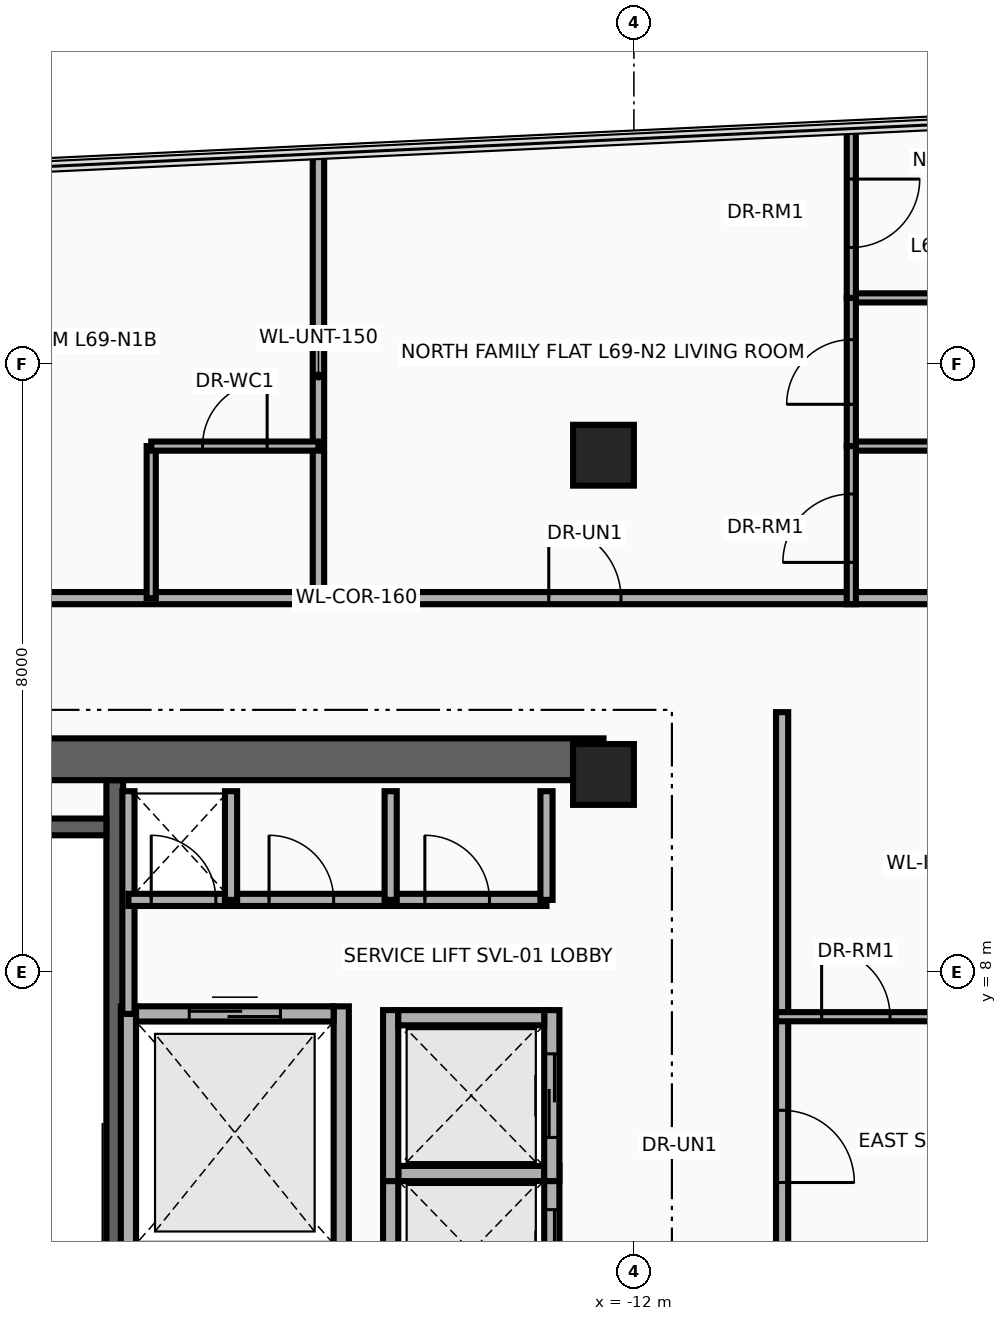
"""IFC4 building model, lengths in metres.
Left out: names, types, materials, properties, quantities, classifications, styles, units other than length and angle.
Written with IfcOpenShell. Run it as: python <this file> out.ifc"""

import sys

from ifc_helpers import new_model, si_unit, direction, frame, frame_2d, origin, origin_2d, place, context, subcontext, project, spatial, rectangle, extrude, source, transform, mapped, element, fill, save


model = new_model("IFC4")
c1 = context("Model", 3, precision=1e-05, world=origin(), true_north=direction((0.0, 1.0)))
c2 = subcontext(c1, "Body", "Model", "MODEL_VIEW")
j1 = project(units=[si_unit("LENGTHUNIT", "METRE"), si_unit("PLANEANGLEUNIT", "RADIAN")], contexts=[c1])
p1 = place(None, origin())
s1 = spatial("IfcSite", under=j1, at=p1, CompositionType="ELEMENT")
p2 = place(p1, origin())
s2 = spatial("IfcBuilding", under=s1, at=p2, CompositionType="ELEMENT")
p3 = place(p2, frame((0.0, 0.0, 266.0)))
s3 = spatial("IfcBuildingStorey", under=s2, at=p3, CompositionType="ELEMENT", Elevation=266.0)
p4 = place(p3, frame((-18.83, 1.78, 0.0), z_axis=(0.0, 0.0, 1.0), x_axis=(0.0, 1.0, 0.0)))
e1 = element("IfcWall", 1, at=p4, inside=s3, PredefinedType="SHEAR", context=c2, shape_type="SweptSolid", body=[
    extrude(rectangle(XDim=8.745, YDim=0.22, at=frame_2d((4.373, 0.0))), origin(), (0.0, 0.0, 1.0), 3.26),
])
p5 = place(p3, frame((-22.05, 9.91, 0.0), z_axis=(0.0, 0.0, 1.0), x_axis=(1.0, 0.0, 0.0)))
e2 = element("IfcWall", 2, at=p5, inside=s3, PredefinedType="SHEAR", context=c2, shape_type="SweptSolid", body=[
    extrude(rectangle(XDim=3.11, YDim=0.22, at=frame_2d((1.555, 0.0))), origin(), (0.0, 0.0, 1.0), 3.26),
])
p6 = place(p3, frame((-22.65, 10.8, 0.0), z_axis=(0.0, 0.0, 1.0), x_axis=(1.0, 0.0, 0.0)))
e3 = element("IfcWall", 3, at=p6, inside=s3, PredefinedType="SHEAR", context=c2, shape_type="SweptSolid", body=[
    extrude(rectangle(XDim=10.25, YDim=0.55, at=frame_2d((5.125, 0.0))), origin(), (0.0, 0.0, 1.0), 3.26),
])
m1 = source(origin(), c2, "Body", "SweptSolid", [
    extrude(rectangle(XDim=0.8, YDim=0.8, at=origin_2d()), origin(), (0.0, 0.0, 1.0), 3.5),
])
for number, where, z_axis, x_axis in (
    (4, (-12.4, 10.6, 0.0), (0.0, 0.0, 1.0), (1.0, 0.0, 0.0)),
    (5, (-12.4, 14.8, 0.0), (0.0, 0.0, 1.0), (1.0, 0.0, 0.0)),
):
    element("IfcColumn", number, at=place(p3, frame(where, z_axis=z_axis, x_axis=x_axis)), inside=s3, PredefinedType="COLUMN", context=c2, shape_type="MappedRepresentation", body=[
        mapped(m1, transform((0.0, 0.0, 0.0), x_axis=(1.0, 0.0, 0.0), y_axis=(0.0, 1.0, 0.0), z_axis=(0.0, 0.0, 1.0), scale=1.0)),
    ])
for number, where, z_axis, x_axis in (
    (6, (-18.65, 4.225, 0.0), (0.0, 0.0, 1.0), (0.0, 1.0, 0.0)),
    (7, (-15.85, 4.225, 0.0), (0.0, 0.0, 1.0), (0.0, 1.0, 0.0)),
):
    element("IfcWall", number, at=place(p3, frame(where, z_axis=z_axis, x_axis=x_axis)), inside=s3, PredefinedType="MOVABLE", context=c2, shape_type="SweptSolid", body=[
        extrude(rectangle(XDim=3.325, YDim=0.2, at=frame_2d((1.663, 0.0))), origin(), (0.0, 0.0, 1.0), 3.26),
    ])
p7 = place(p3, frame((-18.55, 7.45, 0.0), z_axis=(0.0, 0.0, 1.0), x_axis=(1.0, 0.0, 0.0)))
e8 = element("IfcWall", 8, at=p7, inside=s3, PredefinedType="MOVABLE", context=c2, shape_type="SweptSolid", body=[
    extrude(rectangle(XDim=2.6, YDim=0.2, at=frame_2d((1.3, 0.0))), origin(), (0.0, 0.0, 1.0), 3.26),
])
p8 = place(p7, frame((0.7, 0.0, 0.0)))
e9 = element("IfcOpeningElement", 9, at=p8, cuts=e8, PredefinedType="OPENING", context=c2, shape_type="SweptSolid", body=[
    extrude(rectangle(XDim=1.2, YDim=2.1, at=frame_2d((0.6, 1.05))), frame((0.0, 0.115, 0.0), z_axis=(0.0, -1.0, 0.0), x_axis=(1.0, 0.0, 0.0)), (0.0, 0.0, 1.0), 0.23),
])
p9 = place(p3, frame((-15.2, 3.2, 0.0), z_axis=(0.0, 0.0, 1.0), x_axis=(0.0, 1.0, 0.0)))
e10 = element("IfcWall", 10, at=p9, inside=s3, PredefinedType="MOVABLE", context=c2, shape_type="SweptSolid", body=[
    extrude(rectangle(XDim=2.25, YDim=0.2, at=frame_2d((1.125, 0.0))), origin(), (0.0, 0.0, 1.0), 3.26),
])
p10 = place(p3, frame((-13.08, 3.2, 0.0), z_axis=(0.0, 0.0, 1.0), x_axis=(0.0, 1.0, 0.0)))
e11 = element("IfcWall", 11, at=p10, inside=s3, PredefinedType="MOVABLE", context=c2, shape_type="SweptSolid", body=[
    extrude(rectangle(XDim=2.25, YDim=0.2, at=frame_2d((1.125, 0.0))), origin(), (0.0, 0.0, 1.0), 3.26),
])
p11 = place(p10, frame((0.575, 0.0, 0.0)))
e12 = element("IfcOpeningElement", 12, at=p11, cuts=e11, PredefinedType="OPENING", context=c2, shape_type="SweptSolid", body=[
    extrude(rectangle(XDim=1.1, YDim=2.1, at=frame_2d((0.55, 1.05))), frame((0.0, 0.115, 0.0), z_axis=(0.0, -1.0, 0.0), x_axis=(1.0, 0.0, 0.0)), (0.0, 0.0, 1.0), 0.23),
])
p12 = place(p3, frame((-15.1, 5.35, 0.0), z_axis=(0.0, 0.0, 1.0), x_axis=(1.0, 0.0, 0.0)))
e13 = element("IfcWall", 13, at=p12, inside=s3, PredefinedType="MOVABLE", context=c2, shape_type="SweptSolid", body=[
    extrude(rectangle(XDim=1.92, YDim=0.2, at=frame_2d((0.96, 0.0))), origin(), (0.0, 0.0, 1.0), 3.26),
])
p13 = place(p3, frame((-15.2, 5.25, 0.0), z_axis=(0.0, 0.0, 1.0), x_axis=(0.0, 1.0, 0.0)))
e14 = element("IfcWall", 14, at=p13, inside=s3, PredefinedType="MOVABLE", context=c2, shape_type="SweptSolid", body=[
    extrude(rectangle(XDim=2.25, YDim=0.2, at=frame_2d((1.125, 0.0))), origin(), (0.0, 0.0, 1.0), 3.26),
])
p14 = place(p3, frame((-13.08, 5.25, 0.0), z_axis=(0.0, 0.0, 1.0), x_axis=(0.0, 1.0, 0.0)))
e15 = element("IfcWall", 15, at=p14, inside=s3, PredefinedType="MOVABLE", context=c2, shape_type="SweptSolid", body=[
    extrude(rectangle(XDim=2.25, YDim=0.2, at=frame_2d((1.125, 0.0))), origin(), (0.0, 0.0, 1.0), 3.26),
])
p15 = place(p14, frame((0.575, 0.0, 0.0)))
e16 = element("IfcOpeningElement", 16, at=p15, cuts=e15, PredefinedType="OPENING", context=c2, shape_type="SweptSolid", body=[
    extrude(rectangle(XDim=1.1, YDim=2.1, at=frame_2d((0.55, 1.05))), frame((0.0, 0.115, 0.0), z_axis=(0.0, -1.0, 0.0), x_axis=(1.0, 0.0, 0.0)), (0.0, 0.0, 1.0), 0.23),
])
p16 = place(p3, frame((-15.1, 7.4, 0.0), z_axis=(0.0, 0.0, 1.0), x_axis=(1.0, 0.0, 0.0)))
e17 = element("IfcWall", 17, at=p16, inside=s3, PredefinedType="MOVABLE", context=c2, shape_type="SweptSolid", body=[
    extrude(rectangle(XDim=1.92, YDim=0.2, at=frame_2d((0.96, 0.0))), origin(), (0.0, 0.0, 1.0), 3.26),
])
p17 = place(p3, frame((-18.65, 7.45, 0.0), z_axis=(0.0, 0.0, 1.0), x_axis=(0.0, 1.0, 0.0)))
e18 = element("IfcWall", 18, at=p17, inside=s3, PredefinedType="PARTITIONING", context=c2, shape_type="SweptSolid", body=[
    extrude(rectangle(XDim=2.93, YDim=0.16, at=frame_2d((1.465, 0.0))), origin(), (0.0, 0.0, 1.0), 3.26),
])
p18 = place(p3, frame((-18.65, 8.95, 0.0), z_axis=(0.0, 0.0, 1.0), x_axis=(1.0, 0.0, 0.0)))
e19 = element("IfcWall", 19, at=p18, inside=s3, PredefinedType="PARTITIONING", context=c2, shape_type="SweptSolid", body=[
    extrude(rectangle(XDim=5.5, YDim=0.16, at=frame_2d((2.75, 0.0))), origin(), (0.0, 0.0, 1.0), 3.26),
])
p19 = place(p18, frame((0.3, 0.0, 0.0)))
e20 = element("IfcOpeningElement", 20, at=p19, cuts=e19, PredefinedType="OPENING", context=c2, shape_type="SweptSolid", body=[
    extrude(rectangle(XDim=0.85, YDim=2.05, at=frame_2d((0.425, 1.025))), frame((0.0, 0.095, 0.0), z_axis=(0.0, -1.0, 0.0), x_axis=(1.0, 0.0, 0.0)), (0.0, 0.0, 1.0), 0.19),
])
p20 = place(p18, frame((1.85, 0.0, 0.0)))
e21 = element("IfcOpeningElement", 21, at=p20, cuts=e19, PredefinedType="OPENING", context=c2, shape_type="SweptSolid", body=[
    extrude(rectangle(XDim=0.85, YDim=2.05, at=frame_2d((0.425, 1.025))), frame((0.0, 0.095, 0.0), z_axis=(0.0, -1.0, 0.0), x_axis=(1.0, 0.0, 0.0)), (0.0, 0.0, 1.0), 0.19),
])
p21 = place(p18, frame((3.9, 0.0, 0.0)))
e22 = element("IfcOpeningElement", 22, at=p21, cuts=e19, PredefinedType="OPENING", context=c2, shape_type="SweptSolid", body=[
    extrude(rectangle(XDim=0.85, YDim=2.05, at=frame_2d((0.425, 1.025))), frame((0.0, 0.095, 0.0), z_axis=(0.0, -1.0, 0.0), x_axis=(1.0, 0.0, 0.0)), (0.0, 0.0, 1.0), 0.19),
])
for number, where, z_axis, x_axis in (
    (23, (-13.15, 8.95, 0.0), (0.0, 0.0, 1.0), (0.0, 1.0, 0.0)),
    (24, (-17.3, 8.95, 0.0), (0.0, 0.0, 1.0), (0.0, 1.0, 0.0)),
    (25, (-15.2, 8.95, 0.0), (0.0, 0.0, 1.0), (0.0, 1.0, 0.0)),
):
    element("IfcWall", number, at=place(p3, frame(where, z_axis=z_axis, x_axis=x_axis)), inside=s3, PredefinedType="PARTITIONING", context=c2, shape_type="SweptSolid", body=[
        extrude(rectangle(XDim=1.43, YDim=0.16, at=frame_2d((0.715, 0.0))), origin(), (0.0, 0.0, 1.0), 3.26),
    ])
p22 = place(p3, frame((-30.39, 12.92, 0.0), z_axis=(0.0, 0.0, 1.0), x_axis=(1.0, 0.0, 0.0)))
e26 = element("IfcWall", 26, at=p22, inside=s3, PredefinedType="PARTITIONING", context=c2, shape_type="SweptSolid", body=[
    extrude(rectangle(XDim=29.48, YDim=0.16, at=frame_2d((14.74, 0.0))), origin(), (0.0, 0.0, 1.0), 2.634),
])
p23 = place(p22, frame((3.085, 0.0, 0.0)))
e27 = element("IfcOpeningElement", 27, at=p23, cuts=e26, PredefinedType="OPENING", context=c2, shape_type="SweptSolid", body=[
    extrude(rectangle(XDim=0.95, YDim=2.15, at=frame_2d((0.475, 1.075))), frame((0.0, 0.095, 0.0), z_axis=(0.0, -1.0, 0.0), x_axis=(1.0, 0.0, 0.0)), (0.0, 0.0, 1.0), 0.19),
])
p24 = place(p22, frame((9.105, 0.0, 0.0)))
e28 = element("IfcOpeningElement", 28, at=p24, cuts=e26, PredefinedType="OPENING", context=c2, shape_type="SweptSolid", body=[
    extrude(rectangle(XDim=0.95, YDim=2.15, at=frame_2d((0.475, 1.075))), frame((0.0, 0.095, 0.0), z_axis=(0.0, -1.0, 0.0), x_axis=(1.0, 0.0, 0.0)), (0.0, 0.0, 1.0), 0.19),
])
p25 = place(p22, frame((17.27, 0.0, 0.0)))
e29 = element("IfcOpeningElement", 29, at=p25, cuts=e26, PredefinedType="OPENING", context=c2, shape_type="SweptSolid", body=[
    extrude(rectangle(XDim=0.95, YDim=2.15, at=frame_2d((0.475, 1.075))), frame((0.0, 0.095, 0.0), z_axis=(0.0, -1.0, 0.0), x_axis=(1.0, 0.0, 0.0)), (0.0, 0.0, 1.0), 0.19),
])
p26 = place(p3, frame((-16.15, 12.92, 0.0), z_axis=(0.0, 0.0, 1.0), x_axis=(0.0, 1.0, 0.0)))
e30 = element("IfcWall", 30, at=p26, inside=s3, PredefinedType="PARTITIONING", context=c2, shape_type="SweptSolid", body=[
    extrude(rectangle(XDim=5.846, YDim=0.15, at=frame_2d((2.923, 0.0))), origin(), (0.0, 0.0, 1.0), 2.623),
])
p27 = place(p3, frame((-18.35, 12.92, 0.0), z_axis=(0.0, 0.0, 1.0), x_axis=(0.0, 1.0, 0.0)))
e31 = element("IfcWall", 31, at=p27, inside=s3, PredefinedType="PARTITIONING", context=c2, shape_type="SweptSolid", body=[
    extrude(rectangle(XDim=2.0, YDim=0.12, at=frame_2d((1.0, 0.0))), origin(), (0.0, 0.0, 1.0), 2.623),
])
p28 = place(p3, frame((-18.35, 14.92, 0.0), z_axis=(0.0, 0.0, 1.0), x_axis=(1.0, 0.0, 0.0)))
e32 = element("IfcWall", 32, at=p28, inside=s3, PredefinedType="PARTITIONING", context=c2, shape_type="SweptSolid", body=[
    extrude(rectangle(XDim=2.2, YDim=0.12, at=frame_2d((1.1, 0.0))), origin(), (0.0, 0.0, 1.0), 2.623),
])
p29 = place(p28, frame((0.675, 0.0, 0.0)))
e33 = element("IfcOpeningElement", 33, at=p29, cuts=e32, PredefinedType="OPENING", context=c2, shape_type="SweptSolid", body=[
    extrude(rectangle(XDim=0.85, YDim=2.1, at=frame_2d((0.425, 1.05))), frame((0.0, 0.075, 0.0), z_axis=(0.0, -1.0, 0.0), x_axis=(1.0, 0.0, 0.0)), (0.0, 0.0, 1.0), 0.15),
])
p30 = place(p3, frame((-9.14, 14.92, 0.0), z_axis=(0.0, 0.0, 1.0), x_axis=(1.0, 0.0, 0.0)))
e34 = element("IfcWall", 34, at=p30, inside=s3, PredefinedType="PARTITIONING", context=c2, shape_type="SweptSolid", body=[
    extrude(rectangle(XDim=8.23, YDim=0.12, at=frame_2d((4.115, 0.0))), origin(), (0.0, 0.0, 1.0), 3.26),
])
p31 = place(p3, frame((-9.14, 16.87, 0.0), z_axis=(0.0, 0.0, 1.0), x_axis=(1.0, 0.0, 0.0)))
e35 = element("IfcWall", 35, at=p31, inside=s3, PredefinedType="PARTITIONING", context=c2, shape_type="SweptSolid", body=[
    extrude(rectangle(XDim=7.972, YDim=0.12, at=frame_2d((3.986, 0.0))), origin(), (0.0, 0.0, 1.0), 3.26),
])
p32 = place(p3, frame((-9.14, 14.92, 0.0), z_axis=(0.0, 0.0, 1.0), x_axis=(0.0, 1.0, 0.0)))
e36 = element("IfcWall", 36, at=p32, inside=s3, PredefinedType="PARTITIONING", context=c2, shape_type="SweptSolid", body=[
    extrude(rectangle(XDim=1.95, YDim=0.12, at=frame_2d((0.975, 0.0))), origin(), (0.0, 0.0, 1.0), 3.26),
])
p33 = place(p32, frame((0.55, 0.0, 0.0)))
e37 = element("IfcOpeningElement", 37, at=p33, cuts=e36, PredefinedType="OPENING", context=c2, shape_type="SweptSolid", body=[
    extrude(rectangle(XDim=0.85, YDim=2.1, at=frame_2d((0.425, 1.05))), frame((0.0, 0.075, 0.0), z_axis=(0.0, -1.0, 0.0), x_axis=(1.0, 0.0, 0.0)), (0.0, 0.0, 1.0), 0.15),
])
p34 = place(p3, frame((-9.14, 12.84, 0.0), z_axis=(0.0, 0.0, 1.0), x_axis=(0.0, 1.0, 0.0)))
e38 = element("IfcWall", 38, at=p34, inside=s3, PredefinedType="PARTITIONING", context=c2, shape_type="SweptSolid", body=[
    extrude(rectangle(XDim=2.08, YDim=0.12, at=frame_2d((1.04, 0.0))), origin(), (0.0, 0.0, 1.0), 3.26),
])
p35 = place(p34, frame((0.55, 0.0, 0.0)))
e39 = element("IfcOpeningElement", 39, at=p35, cuts=e38, PredefinedType="OPENING", context=c2, shape_type="SweptSolid", body=[
    extrude(rectangle(XDim=0.9, YDim=2.1, at=frame_2d((0.45, 1.05))), frame((0.0, 0.075, 0.0), z_axis=(0.0, -1.0, 0.0), x_axis=(1.0, 0.0, 0.0)), (0.0, 0.0, 1.0), 0.15),
])
p36 = place(p3, frame((-9.14, 16.87, 0.0), z_axis=(0.0, 0.0, 1.0), x_axis=(0.0, 1.0, 0.0)))
e40 = element("IfcWall", 40, at=p36, inside=s3, PredefinedType="PARTITIONING", context=c2, shape_type="SweptSolid", body=[
    extrude(rectangle(XDim=2.227, YDim=0.12, at=frame_2d((1.113, 0.0))), origin(), (0.0, 0.0, 1.0), 3.26),
])
p37 = place(p36, frame((0.663, 0.0, 0.0)))
e41 = element("IfcOpeningElement", 41, at=p37, cuts=e40, PredefinedType="OPENING", context=c2, shape_type="SweptSolid", body=[
    extrude(rectangle(XDim=0.9, YDim=2.1, at=frame_2d((0.45, 1.05))), frame((0.0, 0.075, 0.0), z_axis=(0.0, -1.0, 0.0), x_axis=(1.0, 0.0, 0.0)), (0.0, 0.0, 1.0), 0.15),
])
p38 = place(p3, frame((-10.05, 4.0, 0.0), z_axis=(0.0, 0.0, 1.0), x_axis=(0.0, 1.0, 0.0)))
e42 = element("IfcWall", 42, at=p38, inside=s3, PredefinedType="PARTITIONING", context=c2, shape_type="SweptSolid", body=[
    extrude(rectangle(XDim=7.42, YDim=0.16, at=frame_2d((3.71, 0.0))), origin(), (0.0, 0.0, 1.0), 3.26),
])
p39 = place(p38, frame((1.232, 0.0, 0.0)))
e43 = element("IfcOpeningElement", 43, at=p39, cuts=e42, PredefinedType="OPENING", context=c2, shape_type="SweptSolid", body=[
    extrude(rectangle(XDim=0.95, YDim=2.15, at=frame_2d((0.475, 1.075))), frame((0.0, 0.095, 0.0), z_axis=(0.0, -1.0, 0.0), x_axis=(1.0, 0.0, 0.0)), (0.0, 0.0, 1.0), 0.19),
])
p40 = place(p3, frame((-10.13, 7.413, 0.0), z_axis=(0.0, 0.0, 1.0), x_axis=(1.0, 0.0, 0.0)))
e44 = element("IfcWall", 44, at=p40, inside=s3, PredefinedType="PARTITIONING", context=c2, shape_type="SweptSolid", body=[
    extrude(rectangle(XDim=2.18, YDim=0.12, at=frame_2d((1.09, 0.0))), origin(), (0.0, 0.0, 1.0), 3.26),
])
p41 = place(p40, frame((0.6, 0.0, 0.0)))
e45 = element("IfcOpeningElement", 45, at=p41, cuts=e44, PredefinedType="OPENING", context=c2, shape_type="SweptSolid", body=[
    extrude(rectangle(XDim=0.9, YDim=2.1, at=frame_2d((0.45, 1.05))), frame((0.0, 0.075, 0.0), z_axis=(0.0, -1.0, 0.0), x_axis=(1.0, 0.0, 0.0)), (0.0, 0.0, 1.0), 0.15),
])
p42 = place(p8, origin())
e46 = element("IfcDoor", 46, at=p42, inside=s3, OperationType="DOUBLE_DOOR_SLIDING", PredefinedType="DOOR", context=c2, shape_type="SweptSolid", body=[
    extrude(rectangle(XDim=1.2, YDim=2.1, at=frame_2d((0.6, 1.05))), frame((0.0, 0.025, 0.0), z_axis=(0.0, -1.0, 0.0), x_axis=(1.0, 0.0, 0.0)), (0.0, 0.0, 1.0), 0.05),
])
fill(e9, e46)
p43 = place(p11, origin())
e47 = element("IfcDoor", 47, at=p43, inside=s3, OperationType="DOUBLE_DOOR_SLIDING", PredefinedType="DOOR", context=c2, shape_type="SweptSolid", body=[
    extrude(rectangle(XDim=1.1, YDim=2.1, at=frame_2d((0.55, 1.05))), frame((0.0, 0.025, 0.0), z_axis=(0.0, -1.0, 0.0), x_axis=(1.0, 0.0, 0.0)), (0.0, 0.0, 1.0), 0.05),
])
fill(e12, e47)
p44 = place(p15, origin())
e48 = element("IfcDoor", 48, at=p44, inside=s3, OperationType="DOUBLE_DOOR_SLIDING", PredefinedType="DOOR", context=c2, shape_type="SweptSolid", body=[
    extrude(rectangle(XDim=1.1, YDim=2.1, at=frame_2d((0.55, 1.05))), frame((0.0, 0.025, 0.0), z_axis=(0.0, -1.0, 0.0), x_axis=(1.0, 0.0, 0.0)), (0.0, 0.0, 1.0), 0.05),
])
fill(e16, e48)
p45 = place(p19, origin())
e49 = element("IfcDoor", 49, at=p45, inside=s3, OperationType="SINGLE_SWING_LEFT", PredefinedType="DOOR", context=c2, shape_type="SweptSolid", body=[
    extrude(rectangle(XDim=0.85, YDim=2.05, at=frame_2d((0.425, 1.025))), frame((0.0, 0.025, 0.0), z_axis=(0.0, -1.0, 0.0), x_axis=(1.0, 0.0, 0.0)), (0.0, 0.0, 1.0), 0.05),
])
fill(e20, e49)
p46 = place(p20, origin())
e50 = element("IfcDoor", 50, at=p46, inside=s3, OperationType="SINGLE_SWING_RIGHT", PredefinedType="DOOR", context=c2, shape_type="SweptSolid", body=[
    extrude(rectangle(XDim=0.85, YDim=2.05, at=frame_2d((0.425, 1.025))), frame((0.0, 0.025, 0.0), z_axis=(0.0, -1.0, 0.0), x_axis=(1.0, 0.0, 0.0)), (0.0, 0.0, 1.0), 0.05),
])
fill(e21, e50)
p47 = place(p21, origin())
e51 = element("IfcDoor", 51, at=p47, inside=s3, OperationType="SINGLE_SWING_LEFT", PredefinedType="DOOR", context=c2, shape_type="SweptSolid", body=[
    extrude(rectangle(XDim=0.85, YDim=2.05, at=frame_2d((0.425, 1.025))), frame((0.0, 0.025, 0.0), z_axis=(0.0, -1.0, 0.0), x_axis=(1.0, 0.0, 0.0)), (0.0, 0.0, 1.0), 0.05),
])
fill(e22, e51)
p48 = place(p29, origin())
e52 = element("IfcDoor", 52, at=p48, inside=s3, OperationType="SINGLE_SWING_LEFT", PredefinedType="DOOR", context=c2, shape_type="SweptSolid", body=[
    extrude(rectangle(XDim=0.85, YDim=2.1, at=frame_2d((0.425, 1.05))), frame((0.0, 0.025, 0.0), z_axis=(0.0, -1.0, 0.0), x_axis=(1.0, 0.0, 0.0)), (0.0, 0.0, 1.0), 0.05),
])
fill(e33, e52)
p49 = place(p25, origin())
e53 = element("IfcDoor", 53, at=p49, inside=s3, OperationType="SINGLE_SWING_RIGHT", PredefinedType="DOOR", context=c2, shape_type="SweptSolid", body=[
    extrude(rectangle(XDim=0.95, YDim=2.15, at=frame_2d((0.475, 1.075))), frame((0.0, 0.025, 0.0), z_axis=(0.0, -1.0, 0.0), x_axis=(1.0, 0.0, 0.0)), (0.0, 0.0, 1.0), 0.05),
])
fill(e29, e53)
p50 = place(p33, origin())
e54 = element("IfcDoor", 54, at=p50, inside=s3, OperationType="SINGLE_SWING_LEFT", PredefinedType="DOOR", context=c2, shape_type="SweptSolid", body=[
    extrude(rectangle(XDim=0.85, YDim=2.1, at=frame_2d((0.425, 1.05))), frame((0.0, 0.025, 0.0), z_axis=(0.0, -1.0, 0.0), x_axis=(1.0, 0.0, 0.0)), (0.0, 0.0, 1.0), 0.05),
])
fill(e37, e54)
p51 = place(p35, origin())
e55 = element("IfcDoor", 55, at=p51, inside=s3, OperationType="SINGLE_SWING_RIGHT", PredefinedType="DOOR", context=c2, shape_type="SweptSolid", body=[
    extrude(rectangle(XDim=0.9, YDim=2.1, at=frame_2d((0.45, 1.05))), frame((0.0, 0.025, 0.0), z_axis=(0.0, -1.0, 0.0), x_axis=(1.0, 0.0, 0.0)), (0.0, 0.0, 1.0), 0.05),
])
fill(e39, e55)
p52 = place(p37, frame((0.9, 0.0, 0.0), z_axis=(0.0, 0.0, 1.0), x_axis=(-1.0, 0.0, 0.0)))
e56 = element("IfcDoor", 56, at=p52, inside=s3, OperationType="SINGLE_SWING_LEFT", PredefinedType="DOOR", context=c2, shape_type="SweptSolid", body=[
    extrude(rectangle(XDim=0.9, YDim=2.1, at=frame_2d((0.45, 1.05))), frame((0.0, 0.025, 0.0), z_axis=(0.0, -1.0, 0.0), x_axis=(1.0, 0.0, 0.0)), (0.0, 0.0, 1.0), 0.05),
])
fill(e41, e56)
p53 = place(p39, frame((0.95, 0.0, 0.0), z_axis=(0.0, 0.0, 1.0), x_axis=(-1.0, 0.0, 0.0)))
e57 = element("IfcDoor", 57, at=p53, inside=s3, OperationType="SINGLE_SWING_LEFT", PredefinedType="DOOR", context=c2, shape_type="SweptSolid", body=[
    extrude(rectangle(XDim=0.95, YDim=2.15, at=frame_2d((0.475, 1.075))), frame((0.0, 0.025, 0.0), z_axis=(0.0, -1.0, 0.0), x_axis=(1.0, 0.0, 0.0)), (0.0, 0.0, 1.0), 0.05),
])
fill(e43, e57)
p54 = place(p41, origin())
e58 = element("IfcDoor", 58, at=p54, inside=s3, OperationType="SINGLE_SWING_LEFT", PredefinedType="DOOR", context=c2, shape_type="SweptSolid", body=[
    extrude(rectangle(XDim=0.9, YDim=2.1, at=frame_2d((0.45, 1.05))), frame((0.0, 0.025, 0.0), z_axis=(0.0, -1.0, 0.0), x_axis=(1.0, 0.0, 0.0)), (0.0, 0.0, 1.0), 0.05),
])
fill(e45, e58)
save(model, sys.argv[1])
